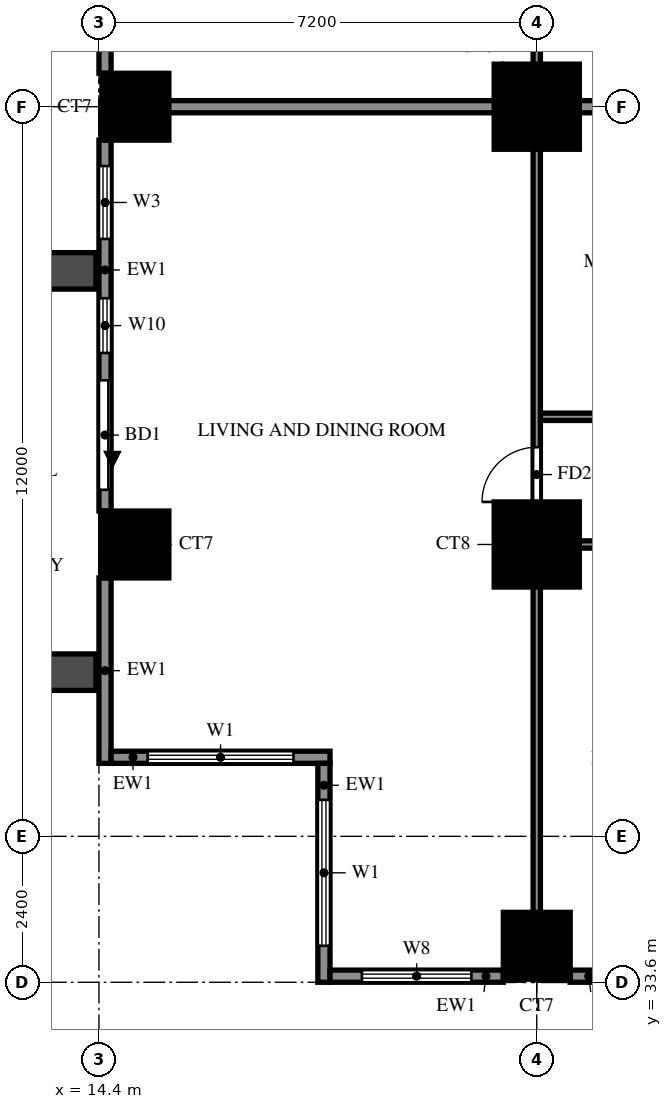
"""IFC4 building model, lengths in metres.
Left out: names, types, materials, properties, quantities, classifications, styles, units other than length and angle.
Written with IfcOpenShell. Run it as: python <this file> out.ifc"""

import sys

from ifc_helpers import new_model, si_unit, direction, frame, frame_2d, origin, origin_2d, place, context, subcontext, project, spatial, rectangle, extrude, source, transform, mapped, element, fill, save


model = new_model("IFC4")
c1 = context("Model", 3, precision=1e-05, world=origin(), true_north=direction((0.0, 1.0)))
c2 = subcontext(c1, "Body", "Model", "MODEL_VIEW")
j1 = project(units=[si_unit("LENGTHUNIT", "METRE"), si_unit("PLANEANGLEUNIT", "RADIAN")], contexts=[c1])
p1 = place(None, origin())
s1 = spatial("IfcSite", under=j1, at=p1, CompositionType="ELEMENT")
p2 = place(p1, origin())
s2 = spatial("IfcBuilding", under=s1, at=p2, CompositionType="ELEMENT")
p3 = place(p2, frame((0.0, 0.0, 30.5)))
s3 = spatial("IfcBuildingStorey", under=s2, at=p3, CompositionType="ELEMENT", Elevation=30.5)
m1 = source(origin(), c2, "Body", "SweptSolid", [
    extrude(rectangle(XDim=1.1, YDim=1.1, at=origin_2d()), origin(), (0.0, 0.0, 1.0), 3.18),
])
for number, where, z_axis, x_axis in (
    (1, (21.6, 34.2, 0.0), (0.0, 0.0, 1.0), (1.0, 0.0, 0.0)),
    (2, (15.0, 40.8, 0.0), (0.0, 0.0, 1.0), (1.0, 0.0, 0.0)),
):
    element("IfcColumn", number, at=place(p3, frame(where, z_axis=z_axis, x_axis=x_axis)), inside=s3, PredefinedType="COLUMN", context=c2, shape_type="MappedRepresentation", body=[
        mapped(m1, transform((0.0, 0.0, 0.0))),
    ])
m2 = source(origin(), c2, "Body", "SweptSolid", [
    extrude(rectangle(XDim=1.4, YDim=1.4, at=origin_2d()), origin(), (0.0, 0.0, 1.0), 3.18),
])
p4 = place(p3, frame((21.6, 40.8, 0.0), z_axis=(0.0, 0.0, 1.0), x_axis=(1.0, 0.0, 0.0)))
e3 = element("IfcColumn", 3, at=p4, inside=s3, PredefinedType="COLUMN", context=c2, shape_type="MappedRepresentation", body=[
    mapped(m2, transform((0.0, 0.0, 0.0))),
])
p5 = place(p3, frame((15.0, 48.0, 0.0), z_axis=(0.0, 0.0, 1.0), x_axis=(1.0, 0.0, 0.0)))
e4 = element("IfcColumn", 4, at=p5, inside=s3, PredefinedType="COLUMN", context=c2, shape_type="MappedRepresentation", body=[
    mapped(m1, transform((0.0, 0.0, 0.0))),
])
p6 = place(p3, frame((21.6, 48.0, 0.0), z_axis=(0.0, 0.0, 1.0), x_axis=(1.0, 0.0, 0.0)))
e5 = element("IfcColumn", 5, at=p6, inside=s3, PredefinedType="COLUMN", context=c2, shape_type="MappedRepresentation", body=[
    mapped(m2, transform((0.0, 0.0, 0.0))),
])
p7 = place(p3, frame((14.5, 54.65, 0.0), z_axis=(0.0, 0.0, 1.0), x_axis=(0.0, -1.0, 0.0)))
e6 = element("IfcWall", 6, at=p7, inside=s3, PredefinedType="SOLIDWALL", context=c2, shape_type="SweptSolid", body=[
    extrude(rectangle(XDim=6.1, YDim=0.2, at=frame_2d((3.05, 0.0))), origin(), (0.0, 0.0, 1.0), 3.18),
])
p8 = place(p7, frame((3.575, 0.0, 0.6)))
e7 = element("IfcOpeningElement", 7, at=p8, cuts=e6, PredefinedType="OPENING", context=c2, shape_type="SweptSolid", body=[
    extrude(rectangle(XDim=1.8, YDim=2.4, at=frame_2d((0.9, 1.2))), frame((0.0, 0.11, 0.0), z_axis=(0.0, -1.0, 0.0), x_axis=(1.0, 0.0, 0.0)), (0.0, 0.0, 1.0), 0.22),
])
p9 = place(p7, frame((2.0, 0.0, 0.6)))
e8 = element("IfcOpeningElement", 8, at=p9, cuts=e6, PredefinedType="OPENING", context=c2, shape_type="SweptSolid", body=[
    extrude(rectangle(XDim=0.9, YDim=2.4, at=frame_2d((0.45, 1.2))), frame((0.0, 0.11, 0.0), z_axis=(0.0, -1.0, 0.0), x_axis=(1.0, 0.0, 0.0)), (0.0, 0.0, 1.0), 0.22),
])
p10 = place(p3, frame((14.5, 47.45, 0.0), z_axis=(0.0, 0.0, 1.0), x_axis=(0.0, -1.0, 0.0)))
e9 = element("IfcWall", 9, at=p10, inside=s3, PredefinedType="SOLIDWALL", context=c2, shape_type="SweptSolid", body=[
    extrude(rectangle(XDim=6.1, YDim=0.2, at=frame_2d((3.05, 0.0))), origin(), (0.0, 0.0, 1.0), 3.18),
])
p11 = place(p10, frame((3.95, 0.0, 0.0)))
e10 = element("IfcOpeningElement", 10, at=p11, cuts=e9, PredefinedType="OPENING", context=c2, shape_type="SweptSolid", body=[
    extrude(rectangle(XDim=1.8, YDim=2.4, at=frame_2d((0.9, 1.2))), frame((0.0, 0.11, 0.0), z_axis=(0.0, -1.0, 0.0), x_axis=(1.0, 0.0, 0.0)), (0.0, 0.0, 1.0), 0.22),
])
p12 = place(p10, frame((0.425, 0.0, 0.6)))
e11 = element("IfcOpeningElement", 11, at=p12, cuts=e9, PredefinedType="OPENING", context=c2, shape_type="SweptSolid", body=[
    extrude(rectangle(XDim=1.2, YDim=2.4, at=frame_2d((0.6, 1.2))), frame((0.0, 0.11, 0.0), z_axis=(0.0, -1.0, 0.0), x_axis=(1.0, 0.0, 0.0)), (0.0, 0.0, 1.0), 0.22),
])
p13 = place(p10, frame((2.6, 0.0, 0.6)))
e12 = element("IfcOpeningElement", 12, at=p13, cuts=e9, PredefinedType="OPENING", context=c2, shape_type="SweptSolid", body=[
    extrude(rectangle(XDim=0.9, YDim=2.4, at=frame_2d((0.45, 1.2))), frame((0.0, 0.11, 0.0), z_axis=(0.0, -1.0, 0.0), x_axis=(1.0, 0.0, 0.0)), (0.0, 0.0, 1.0), 0.22),
])
p14 = place(p3, frame((14.5, 40.25, 0.0), z_axis=(0.0, 0.0, 1.0), x_axis=(0.0, -1.0, 0.0)))
e13 = element("IfcWall", 13, at=p14, inside=s3, PredefinedType="SOLIDWALL", context=c2, shape_type="SweptSolid", body=[
    extrude(rectangle(XDim=3.05, YDim=0.2, at=frame_2d((1.525, 0.0))), origin(), (0.0, 0.0, 1.0), 3.18),
])
p15 = place(p3, frame((14.6, 37.3, 0.0), z_axis=(0.0, 0.0, 1.0), x_axis=(1.0, 0.0, 0.0)))
e14 = element("IfcWall", 14, at=p15, inside=s3, PredefinedType="SOLIDWALL", context=c2, shape_type="SweptSolid", body=[
    extrude(rectangle(XDim=3.6, YDim=0.2, at=frame_2d((1.8, 0.0))), origin(), (0.0, 0.0, 1.0), 3.18),
])
p16 = place(p15, frame((0.6, 0.0, 0.6)))
e15 = element("IfcOpeningElement", 15, at=p16, cuts=e14, PredefinedType="OPENING", context=c2, shape_type="SweptSolid", body=[
    extrude(rectangle(XDim=2.4, YDim=2.4, at=frame_2d((1.2, 1.2))), frame((0.0, 0.11, 0.0), z_axis=(0.0, -1.0, 0.0), x_axis=(1.0, 0.0, 0.0)), (0.0, 0.0, 1.0), 0.22),
])
p17 = place(p3, frame((18.1, 37.2, 0.0), z_axis=(0.0, 0.0, 1.0), x_axis=(0.0, -1.0, 0.0)))
e16 = element("IfcWall", 16, at=p17, inside=s3, PredefinedType="SOLIDWALL", context=c2, shape_type="SweptSolid", body=[
    extrude(rectangle(XDim=3.6, YDim=0.2, at=frame_2d((1.8, 0.0))), origin(), (0.0, 0.0, 1.0), 3.18),
])
p18 = place(p17, frame((0.6, 0.0, 0.6)))
e17 = element("IfcOpeningElement", 17, at=p18, cuts=e16, PredefinedType="OPENING", context=c2, shape_type="SweptSolid", body=[
    extrude(rectangle(XDim=2.4, YDim=2.4, at=frame_2d((1.2, 1.2))), frame((0.0, 0.11, 0.0), z_axis=(0.0, -1.0, 0.0), x_axis=(1.0, 0.0, 0.0)), (0.0, 0.0, 1.0), 0.22),
])
p19 = place(p3, frame((18.2, 33.7, 0.0), z_axis=(0.0, 0.0, 1.0), x_axis=(1.0, 0.0, 0.0)))
e18 = element("IfcWall", 18, at=p19, inside=s3, PredefinedType="SOLIDWALL", context=c2, shape_type="SweptSolid", body=[
    extrude(rectangle(XDim=2.85, YDim=0.2, at=frame_2d((1.425, 0.0))), origin(), (0.0, 0.0, 1.0), 3.18),
])
p20 = place(p19, frame((0.525, 0.0, 0.6)))
e19 = element("IfcOpeningElement", 19, at=p20, cuts=e18, PredefinedType="OPENING", context=c2, shape_type="SweptSolid", body=[
    extrude(rectangle(XDim=1.8, YDim=2.4, at=frame_2d((0.9, 1.2))), frame((0.0, 0.11, 0.0), z_axis=(0.0, -1.0, 0.0), x_axis=(1.0, 0.0, 0.0)), (0.0, 0.0, 1.0), 0.22),
])
p21 = place(p3, frame((22.15, 33.7, 0.0), z_axis=(0.0, 0.0, 1.0), x_axis=(1.0, 0.0, 0.0)))
e20 = element("IfcWall", 20, at=p21, inside=s3, PredefinedType="SOLIDWALL", context=c2, shape_type="SweptSolid", body=[
    extrude(rectangle(XDim=6.1, YDim=0.2, at=frame_2d((3.05, 0.0))), origin(), (0.0, 0.0, 1.0), 3.18),
])
p22 = place(p21, frame((0.725, 0.0, 0.6)))
e21 = element("IfcOpeningElement", 21, at=p22, cuts=e20, PredefinedType="OPENING", context=c2, shape_type="SweptSolid", body=[
    extrude(rectangle(XDim=1.8, YDim=2.4, at=frame_2d((0.9, 1.2))), frame((0.0, 0.11, 0.0), z_axis=(0.0, -1.0, 0.0), x_axis=(1.0, 0.0, 0.0)), (0.0, 0.0, 1.0), 0.22),
])
p23 = place(p21, frame((3.575, 0.0, 0.6)))
e22 = element("IfcOpeningElement", 22, at=p23, cuts=e20, PredefinedType="OPENING", context=c2, shape_type="SweptSolid", body=[
    extrude(rectangle(XDim=1.8, YDim=2.4, at=frame_2d((0.9, 1.2))), frame((0.0, 0.11, 0.0), z_axis=(0.0, -1.0, 0.0), x_axis=(1.0, 0.0, 0.0)), (0.0, 0.0, 1.0), 0.22),
])
for number, where, z_axis, x_axis in (
    (23, (14.35, 45.3, 0.0), (0.0, 0.0, 1.0), (-1.0, 0.0, 0.0)),
    (24, (14.35, 38.7, 0.0), (0.0, 0.0, 1.0), (-1.0, 0.0, 0.0)),
):
    element("IfcWall", number, at=place(p3, frame(where, z_axis=z_axis, x_axis=x_axis)), inside=s3, PredefinedType="SOLIDWALL", context=c2, shape_type="SweptSolid", body=[
        extrude(rectangle(XDim=2.65, YDim=0.6, at=frame_2d((1.325, 0.0))), origin(), (0.0, 0.0, 1.0), 2.85),
    ])
p24 = place(p3, frame((14.525, 48.0, 0.0), z_axis=(0.0, 0.0, 1.0), x_axis=(1.0, 0.0, 0.0)))
e25 = element("IfcWall", 25, at=p24, inside=s3, PredefinedType="SOLIDWALL", context=c2, shape_type="SweptSolid", body=[
    extrude(rectangle(XDim=19.075, YDim=0.2, at=frame_2d((9.538, 0.0))), origin(), (0.0, 0.0, 1.0), 3.18),
])
p25 = place(p3, frame((21.6, 40.8, 0.0), z_axis=(0.0, 0.0, 1.0), x_axis=(1.0, 0.0, 0.0)))
e26 = element("IfcWall", 26, at=p25, inside=s3, PredefinedType="PARTITIONING", context=c2, shape_type="SweptSolid", body=[
    extrude(rectangle(XDim=7.2, YDim=0.12, at=frame_2d((3.6, 0.0))), origin(), (0.0, 0.0, 1.0), 3.18),
])
p26 = place(p25, frame((1.35, 0.0, 0.0)))
e27 = element("IfcOpeningElement", 27, at=p26, cuts=e26, PredefinedType="OPENING", context=c2, shape_type="SweptSolid", body=[
    extrude(rectangle(XDim=0.9, YDim=2.1, at=frame_2d((0.45, 1.05))), frame((0.0, 0.07, 0.0), z_axis=(0.0, -1.0, 0.0), x_axis=(1.0, 0.0, 0.0)), (0.0, 0.0, 1.0), 0.14),
])
p27 = place(p25, frame((4.95, 0.0, 0.0)))
e28 = element("IfcOpeningElement", 28, at=p27, cuts=e26, PredefinedType="OPENING", context=c2, shape_type="SweptSolid", body=[
    extrude(rectangle(XDim=0.9, YDim=2.1, at=frame_2d((0.45, 1.05))), frame((0.0, 0.07, 0.0), z_axis=(0.0, -1.0, 0.0), x_axis=(1.0, 0.0, 0.0)), (0.0, 0.0, 1.0), 0.14),
])
p28 = place(p3, frame((21.6, 42.9, 0.0), z_axis=(0.0, 0.0, 1.0), x_axis=(1.0, 0.0, 0.0)))
e29 = element("IfcWall", 29, at=p28, inside=s3, PredefinedType="PARTITIONING", context=c2, shape_type="SweptSolid", body=[
    extrude(rectangle(XDim=15.6, YDim=0.12, at=frame_2d((7.8, 0.0))), origin(), (0.0, 0.0, 1.0), 3.18),
])
p29 = place(p28, frame((1.375, 0.0, 0.0)))
e30 = element("IfcOpeningElement", 30, at=p29, cuts=e29, PredefinedType="OPENING", context=c2, shape_type="SweptSolid", body=[
    extrude(rectangle(XDim=0.9, YDim=2.1, at=frame_2d((0.45, 1.05))), frame((0.0, 0.07, 0.0), z_axis=(0.0, -1.0, 0.0), x_axis=(1.0, 0.0, 0.0)), (0.0, 0.0, 1.0), 0.14),
])
p30 = place(p28, frame((5.5, 0.0, 0.0)))
e31 = element("IfcOpeningElement", 31, at=p30, cuts=e29, PredefinedType="OPENING", context=c2, shape_type="SweptSolid", body=[
    extrude(rectangle(XDim=0.9, YDim=2.1, at=frame_2d((0.45, 1.05))), frame((0.0, 0.07, 0.0), z_axis=(0.0, -1.0, 0.0), x_axis=(1.0, 0.0, 0.0)), (0.0, 0.0, 1.0), 0.14),
])
p31 = place(p28, frame((9.725, 0.0, 0.0)))
e32 = element("IfcOpeningElement", 32, at=p31, cuts=e29, PredefinedType="OPENING", context=c2, shape_type="SweptSolid", body=[
    extrude(rectangle(XDim=0.8, YDim=2.1, at=frame_2d((0.4, 1.05))), frame((0.0, 0.07, 0.0), z_axis=(0.0, -1.0, 0.0), x_axis=(1.0, 0.0, 0.0)), (0.0, 0.0, 1.0), 0.14),
])
p32 = place(p28, frame((13.35, 0.0, 0.0)))
e33 = element("IfcOpeningElement", 33, at=p32, cuts=e29, PredefinedType="OPENING", context=c2, shape_type="SweptSolid", body=[
    extrude(rectangle(XDim=0.9, YDim=2.1, at=frame_2d((0.45, 1.05))), frame((0.0, 0.07, 0.0), z_axis=(0.0, -1.0, 0.0), x_axis=(1.0, 0.0, 0.0)), (0.0, 0.0, 1.0), 0.14),
])
p33 = place(p3, frame((21.6, 33.725, 0.0), z_axis=(0.0, 0.0, 1.0), x_axis=(0.0, 1.0, 0.0)))
e34 = element("IfcWall", 34, at=p33, inside=s3, PredefinedType="PARTITIONING", context=c2, shape_type="SweptSolid", body=[
    extrude(rectangle(XDim=35.875, YDim=0.12, at=frame_2d((17.938, 0.0))), origin(), (0.0, 0.0, 1.0), 3.18),
])
p34 = place(p33, frame((7.775, 0.0, 0.0)))
e35 = element("IfcOpeningElement", 35, at=p34, cuts=e34, PredefinedType="OPENING", context=c2, shape_type="SweptSolid", body=[
    extrude(rectangle(XDim=0.9, YDim=2.1, at=frame_2d((0.45, 1.05))), frame((0.0, 0.07, 0.0), z_axis=(0.0, -1.0, 0.0), x_axis=(1.0, 0.0, 0.0)), (0.0, 0.0, 1.0), 0.14),
])
p35 = place(p33, frame((15.625, 0.0, 0.0)))
e36 = element("IfcOpeningElement", 36, at=p35, cuts=e34, PredefinedType="OPENING", context=c2, shape_type="SweptSolid", body=[
    extrude(rectangle(XDim=0.9, YDim=2.1, at=frame_2d((0.45, 1.05))), frame((0.0, 0.07, 0.0), z_axis=(0.0, -1.0, 0.0), x_axis=(1.0, 0.0, 0.0)), (0.0, 0.0, 1.0), 0.14),
])
p36 = place(p33, frame((22.225, 0.0, 0.0)))
e37 = element("IfcOpeningElement", 37, at=p36, cuts=e34, PredefinedType="OPENING", context=c2, shape_type="SweptSolid", body=[
    extrude(rectangle(XDim=1.5, YDim=2.1, at=frame_2d((0.75, 1.05))), frame((0.0, 0.07, 0.0), z_axis=(0.0, -1.0, 0.0), x_axis=(1.0, 0.0, 0.0)), (0.0, 0.0, 1.0), 0.14),
])
p37 = place(p33, frame((26.425, 0.0, 0.0)))
e38 = element("IfcOpeningElement", 38, at=p37, cuts=e34, PredefinedType="OPENING", context=c2, shape_type="SweptSolid", body=[
    extrude(rectangle(XDim=0.9, YDim=2.1, at=frame_2d((0.45, 1.05))), frame((0.0, 0.07, 0.0), z_axis=(0.0, -1.0, 0.0), x_axis=(1.0, 0.0, 0.0)), (0.0, 0.0, 1.0), 0.14),
])
p38 = place(p33, frame((30.025, 0.0, 0.0)))
e39 = element("IfcOpeningElement", 39, at=p38, cuts=e34, PredefinedType="OPENING", context=c2, shape_type="SweptSolid", body=[
    extrude(rectangle(XDim=0.9, YDim=2.1, at=frame_2d((0.45, 1.05))), frame((0.0, 0.07, 0.0), z_axis=(0.0, -1.0, 0.0), x_axis=(1.0, 0.0, 0.0)), (0.0, 0.0, 1.0), 0.14),
])
p39 = place(p33, frame((33.625, 0.0, 0.0)))
e40 = element("IfcOpeningElement", 40, at=p39, cuts=e34, PredefinedType="OPENING", context=c2, shape_type="SweptSolid", body=[
    extrude(rectangle(XDim=0.9, YDim=2.1, at=frame_2d((0.45, 1.05))), frame((0.0, 0.07, 0.0), z_axis=(0.0, -1.0, 0.0), x_axis=(1.0, 0.0, 0.0)), (0.0, 0.0, 1.0), 0.14),
])
p40 = place(p11, origin())
e41 = element("IfcDoor", 41, at=p40, inside=s3, OperationType="DOUBLE_DOOR_SLIDING", PredefinedType="DOOR", context=c2, shape_type="SweptSolid", body=[
    extrude(rectangle(XDim=1.8, YDim=2.4, at=frame_2d((0.9, 1.2))), frame((0.0, 0.025, 0.0), z_axis=(0.0, -1.0, 0.0), x_axis=(1.0, 0.0, 0.0)), (0.0, 0.0, 1.0), 0.05),
])
fill(e10, e41)
p41 = place(p12, origin())
e42 = element("IfcWindow", 42, at=p41, inside=s3, PartitioningType="SINGLE_PANEL", PredefinedType="WINDOW", context=c2, shape_type="SweptSolid", body=[
    extrude(rectangle(XDim=1.2, YDim=2.4, at=frame_2d((0.6, 1.2))), frame((0.0, 0.03, 0.0), z_axis=(0.0, -1.0, 0.0), x_axis=(1.0, 0.0, 0.0)), (0.0, 0.0, 1.0), 0.06),
])
fill(e11, e42)
p42 = place(p13, origin())
e43 = element("IfcWindow", 43, at=p42, inside=s3, PartitioningType="SINGLE_PANEL", PredefinedType="WINDOW", context=c2, shape_type="SweptSolid", body=[
    extrude(rectangle(XDim=0.9, YDim=2.4, at=frame_2d((0.45, 1.2))), frame((0.0, 0.03, 0.0), z_axis=(0.0, -1.0, 0.0), x_axis=(1.0, 0.0, 0.0)), (0.0, 0.0, 1.0), 0.06),
])
fill(e12, e43)
p43 = place(p16, origin())
e44 = element("IfcWindow", 44, at=p43, inside=s3, PartitioningType="DOUBLE_PANEL_VERTICAL", PredefinedType="WINDOW", context=c2, shape_type="SweptSolid", body=[
    extrude(rectangle(XDim=2.4, YDim=2.4, at=frame_2d((1.2, 1.2))), frame((0.0, 0.03, 0.0), z_axis=(0.0, -1.0, 0.0), x_axis=(1.0, 0.0, 0.0)), (0.0, 0.0, 1.0), 0.06),
])
fill(e15, e44)
p44 = place(p18, origin())
e45 = element("IfcWindow", 45, at=p44, inside=s3, PartitioningType="DOUBLE_PANEL_VERTICAL", PredefinedType="WINDOW", context=c2, shape_type="SweptSolid", body=[
    extrude(rectangle(XDim=2.4, YDim=2.4, at=frame_2d((1.2, 1.2))), frame((0.0, 0.03, 0.0), z_axis=(0.0, -1.0, 0.0), x_axis=(1.0, 0.0, 0.0)), (0.0, 0.0, 1.0), 0.06),
])
fill(e17, e45)
p45 = place(p20, origin())
e46 = element("IfcWindow", 46, at=p45, inside=s3, PartitioningType="DOUBLE_PANEL_VERTICAL", PredefinedType="WINDOW", context=c2, shape_type="SweptSolid", body=[
    extrude(rectangle(XDim=1.8, YDim=2.4, at=frame_2d((0.9, 1.2))), frame((0.0, 0.03, 0.0), z_axis=(0.0, -1.0, 0.0), x_axis=(1.0, 0.0, 0.0)), (0.0, 0.0, 1.0), 0.06),
])
fill(e19, e46)
p46 = place(p34, origin())
e47 = element("IfcDoor", 47, at=p46, inside=s3, OperationType="SINGLE_SWING_RIGHT", PredefinedType="DOOR", context=c2, shape_type="SweptSolid", body=[
    extrude(rectangle(XDim=0.9, YDim=2.1, at=frame_2d((0.45, 1.05))), frame((0.0, 0.025, 0.0), z_axis=(0.0, -1.0, 0.0), x_axis=(1.0, 0.0, 0.0)), (0.0, 0.0, 1.0), 0.05),
])
fill(e35, e47)
save(model, sys.argv[1])
